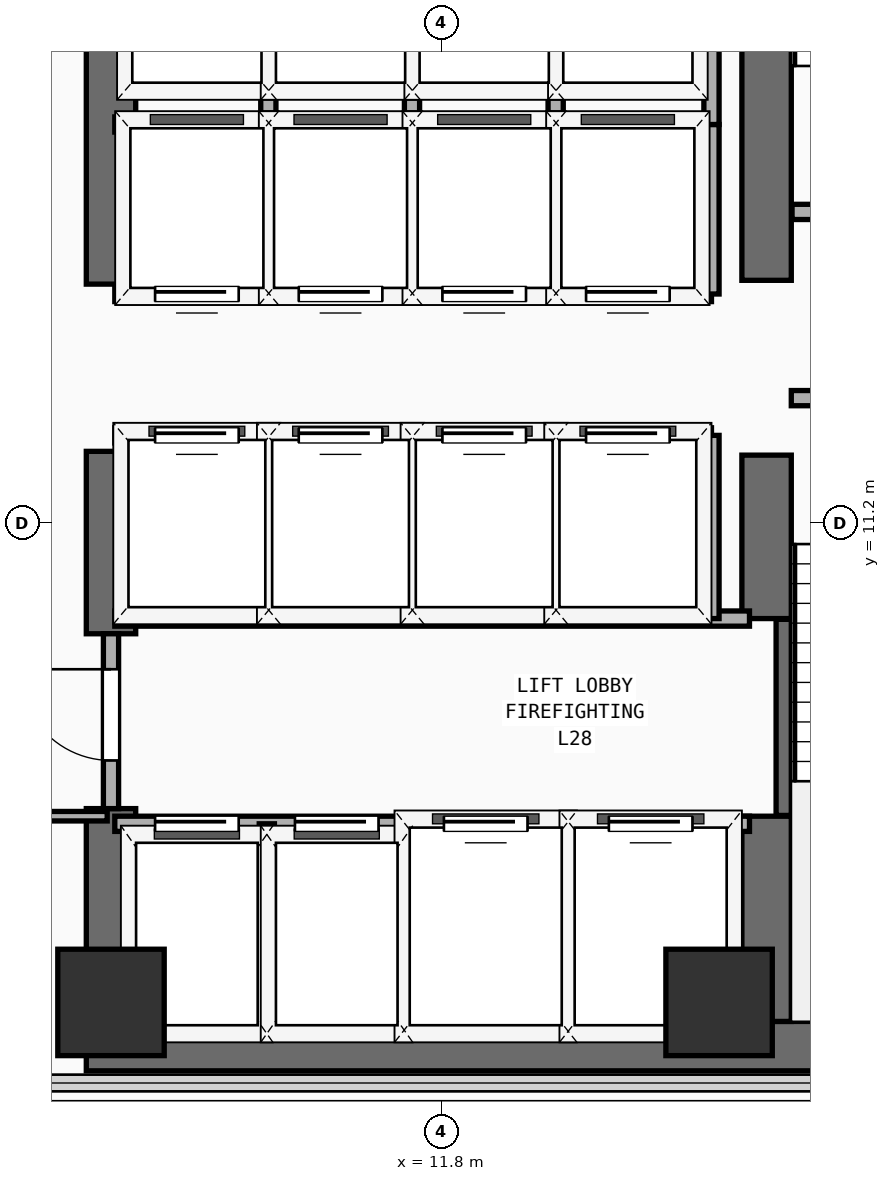
"""IFC4 building model, lengths in metres.
Left out: names, types, materials, properties, quantities, classifications, styles, units other than length and angle.
Written with IfcOpenShell. Run it as: python <this file> out.ifc"""

import sys

from ifc_helpers import new_model, si_unit, direction, frame, frame_2d, origin, origin_2d, place, context, subcontext, project, spatial, rectangle, extrude, element, fill, save


model = new_model("IFC4")
c1 = context("Model", 3, precision=1e-05, world=origin(), true_north=direction((0.0, 1.0)))
c2 = subcontext(c1, "Body", "Model", "MODEL_VIEW")
j1 = project(units=[si_unit("LENGTHUNIT", "METRE"), si_unit("PLANEANGLEUNIT", "RADIAN")], contexts=[c1])
p1 = place(None, origin())
s1 = spatial("IfcSite", under=j1, at=p1, CompositionType="ELEMENT")
p2 = place(p1, origin())
s2 = spatial("IfcBuilding", under=s1, at=p2, CompositionType="ELEMENT")
p3 = place(p2, frame((0.0, 0.0, 110.7)))
s3 = spatial("IfcBuildingStorey", under=s2, at=p3, CompositionType="ELEMENT", Elevation=110.7)
p4 = place(p3, frame((7.125, 4.325, 0.0), z_axis=(0.0, 0.0, 1.0), x_axis=(1.0, 0.0, 0.0)))
e1 = element("IfcWall", 1, at=p4, inside=s3, PredefinedType="SHEAR", context=c2, shape_type="SweptSolid", body=[
    extrude(rectangle(XDim=14.0, YDim=0.65, at=frame_2d((7.0, 0.0))), origin(), (0.0, 0.0, 1.0), 3.54),
])
p5 = place(p3, frame((7.45, 4.65, 0.0), z_axis=(0.0, 0.0, 1.0), x_axis=(0.0, 1.0, 0.0)))
e2 = element("IfcWall", 2, at=p5, inside=s3, PredefinedType="SHEAR", context=c2, shape_type="SweptSolid", body=[
    extrude(rectangle(XDim=2.8, YDim=0.65, at=frame_2d((1.4, 0.0))), origin(), (0.0, 0.0, 1.0), 3.54),
])
p6 = place(p3, frame((7.45, 9.75, 0.0), z_axis=(0.0, 0.0, 1.0), x_axis=(0.0, 1.0, 0.0)))
e3 = element("IfcWall", 3, at=p6, inside=s3, PredefinedType="SHEAR", context=c2, shape_type="SweptSolid", body=[
    extrude(rectangle(XDim=2.4, YDim=0.65, at=frame_2d((1.2, 0.0))), origin(), (0.0, 0.0, 1.0), 3.54),
])
p7 = place(p3, frame((7.45, 14.35, 0.0), z_axis=(0.0, 0.0, 1.0), x_axis=(0.0, 1.0, 0.0)))
e4 = element("IfcWall", 4, at=p7, inside=s3, PredefinedType="SHEAR", context=c2, shape_type="SweptSolid", body=[
    extrude(rectangle(XDim=4.81, YDim=0.65, at=frame_2d((2.405, 0.0))), origin(), (0.0, 0.0, 1.0), 3.54),
])
p8 = place(p3, frame((16.075, 4.65, 0.0), z_axis=(0.0, 0.0, 1.0), x_axis=(0.0, 1.0, 0.0)))
e5 = element("IfcWall", 5, at=p8, inside=s3, PredefinedType="SHEAR", context=c2, shape_type="SweptSolid", body=[
    extrude(rectangle(XDim=2.7, YDim=0.65, at=frame_2d((1.35, 0.0))), origin(), (0.0, 0.0, 1.0), 3.54),
])
p9 = place(p3, frame((16.075, 9.95, 0.0), z_axis=(0.0, 0.0, 1.0), x_axis=(0.0, 1.0, 0.0)))
e6 = element("IfcWall", 6, at=p9, inside=s3, PredefinedType="SHEAR", context=c2, shape_type="SweptSolid", body=[
    extrude(rectangle(XDim=2.15, YDim=0.65, at=frame_2d((1.075, 0.0))), origin(), (0.0, 0.0, 1.0), 3.54),
])
p10 = place(p3, frame((16.075, 14.4, 0.0), z_axis=(0.0, 0.0, 1.0), x_axis=(0.0, 1.0, 0.0)))
e7 = element("IfcWall", 7, at=p10, inside=s3, PredefinedType="SHEAR", context=c2, shape_type="SweptSolid", body=[
    extrude(rectangle(XDim=9.1, YDim=0.65, at=frame_2d((4.55, 0.0))), origin(), (0.0, 0.0, 1.0), 3.54),
])
for number, where, z_axis, x_axis in (
    (8, (7.45, 4.9, 0.0), (0.0, 0.0, 1.0), (1.0, 0.0, 0.0)),
    (9, (15.45, 4.9, 0.0), (0.0, 0.0, 1.0), (1.0, 0.0, 0.0)),
):
    element("IfcColumn", number, at=place(p3, frame(where, z_axis=z_axis, x_axis=x_axis)), inside=s3, PredefinedType="COLUMN", context=c2, shape_type="SweptSolid", body=[
        extrude(rectangle(XDim=1.4, YDim=1.4, at=origin_2d()), origin(), (0.0, 0.0, 1.0), 3.54),
    ])
p11 = place(p3, frame((16.3, 7.36, 0.0), z_axis=(0.0, 0.0, 1.0), x_axis=(0.0, 1.0, 0.0)))
e10 = element("IfcWall", 10, at=p11, inside=s3, PredefinedType="SHEAR", context=c2, shape_type="SweptSolid", body=[
    extrude(rectangle(XDim=2.58, YDim=0.2, at=frame_2d((1.29, 0.0))), origin(), (0.0, 0.0, 1.0), 3.54),
])
p12 = place(p3, frame((16.4, 12.85, 0.0), z_axis=(0.0, 0.0, 1.0), x_axis=(1.0, 0.0, 0.0)))
e11 = element("IfcWall", 11, at=p12, inside=s3, PredefinedType="PARTITIONING", context=c2, shape_type="SweptSolid", body=[
    extrude(rectangle(XDim=3.96, YDim=0.2, at=frame_2d((1.98, 0.0))), origin(), (0.0, 0.0, 1.0), 3.54),
])
p13 = place(p12, frame((1.304, 0.0, 0.0)))
e12 = element("IfcOpeningElement", 12, at=p13, cuts=e11, PredefinedType="OPENING", context=c2, shape_type="SweptSolid", body=[
    extrude(rectangle(XDim=1.1, YDim=2.2, at=frame_2d((0.55, 1.1))), frame((0.0, 0.11, 0.0), z_axis=(0.0, -1.0, 0.0), x_axis=(1.0, 0.0, 0.0)), (0.0, 0.0, 1.0), 0.22),
])
p14 = place(p3, frame((16.41, 15.3, 0.0), z_axis=(0.0, 0.0, 1.0), x_axis=(1.0, 0.0, 0.0)))
e13 = element("IfcWall", 13, at=p14, inside=s3, PredefinedType="PARTITIONING", context=c2, shape_type="SweptSolid", body=[
    extrude(rectangle(XDim=3.95, YDim=0.2, at=frame_2d((1.975, 0.0))), origin(), (0.0, 0.0, 1.0), 3.54),
])
p15 = place(p14, frame((1.294, 0.0, 0.0)))
e14 = element("IfcOpeningElement", 14, at=p15, cuts=e13, PredefinedType="OPENING", context=c2, shape_type="SweptSolid", body=[
    extrude(rectangle(XDim=1.1, YDim=2.2, at=frame_2d((0.55, 1.1))), frame((0.0, 0.11, 0.0), z_axis=(0.0, -1.0, 0.0), x_axis=(1.0, 0.0, 0.0)), (0.0, 0.0, 1.0), 0.22),
])
p16 = place(p3, frame((7.5, 7.25, 0.0), z_axis=(0.0, 0.0, 1.0), x_axis=(1.0, 0.0, 0.0)))
e15 = element("IfcWall", 15, at=p16, inside=s3, PredefinedType="PARTITIONING", context=c2, shape_type="SweptSolid", body=[
    extrude(rectangle(XDim=8.35, YDim=0.2, at=frame_2d((4.175, 0.0))), origin(), (0.0, 0.0, 1.0), 3.54),
])
p17 = place(p16, frame((0.53, 0.0, 0.0)))
e16 = element("IfcOpeningElement", 16, at=p17, cuts=e15, PredefinedType="OPENING", context=c2, shape_type="SweptSolid", body=[
    extrude(rectangle(XDim=1.1, YDim=2.2, at=frame_2d((0.55, 1.1))), frame((0.0, 0.11, 0.0), z_axis=(0.0, -1.0, 0.0), x_axis=(1.0, 0.0, 0.0)), (0.0, 0.0, 1.0), 0.22),
])
p18 = place(p16, frame((2.37, 0.0, 0.0)))
e17 = element("IfcOpeningElement", 17, at=p18, cuts=e15, PredefinedType="OPENING", context=c2, shape_type="SweptSolid", body=[
    extrude(rectangle(XDim=1.1, YDim=2.2, at=frame_2d((0.55, 1.1))), frame((0.0, 0.11, 0.0), z_axis=(0.0, -1.0, 0.0), x_axis=(1.0, 0.0, 0.0)), (0.0, 0.0, 1.0), 0.22),
])
p19 = place(p16, frame((4.33, 0.0, 0.0)))
e18 = element("IfcOpeningElement", 18, at=p19, cuts=e15, PredefinedType="OPENING", context=c2, shape_type="SweptSolid", body=[
    extrude(rectangle(XDim=1.1, YDim=2.2, at=frame_2d((0.55, 1.1))), frame((0.0, 0.11, 0.0), z_axis=(0.0, -1.0, 0.0), x_axis=(1.0, 0.0, 0.0)), (0.0, 0.0, 1.0), 0.22),
])
p20 = place(p16, frame((6.5, 0.0, 0.0)))
e19 = element("IfcOpeningElement", 19, at=p20, cuts=e15, PredefinedType="OPENING", context=c2, shape_type="SweptSolid", body=[
    extrude(rectangle(XDim=1.1, YDim=2.2, at=frame_2d((0.55, 1.1))), frame((0.0, 0.11, 0.0), z_axis=(0.0, -1.0, 0.0), x_axis=(1.0, 0.0, 0.0)), (0.0, 0.0, 1.0), 0.22),
])
p21 = place(p3, frame((7.5, 9.95, 0.0), z_axis=(0.0, 0.0, 1.0), x_axis=(1.0, 0.0, 0.0)))
e20 = element("IfcWall", 20, at=p21, inside=s3, PredefinedType="PARTITIONING", context=c2, shape_type="SweptSolid", body=[
    extrude(rectangle(XDim=8.35, YDim=0.2, at=frame_2d((4.175, 0.0))), origin(), (0.0, 0.0, 1.0), 3.54),
])
for number, where, z_axis, x_axis in (
    (21, (9.5, 4.45, 0.0), (0.0, 0.0, 1.0), (0.0, 1.0, 0.0)),
    (22, (11.36, 4.45, 0.0), (0.0, 0.0, 1.0), (0.0, 1.0, 0.0)),
    (23, (13.46, 4.45, 0.0), (0.0, 0.0, 1.0), (0.0, 1.0, 0.0)),
):
    element("IfcWall", number, at=place(p3, frame(where, z_axis=z_axis, x_axis=x_axis)), inside=s3, PredefinedType="PARTITIONING", context=c2, shape_type="SweptSolid", body=[
        extrude(rectangle(XDim=2.8, YDim=0.2, at=frame_2d((1.4, 0.0))), origin(), (0.0, 0.0, 1.0), 3.54),
    ])
p22 = place(p3, frame((7.45, 7.45, 0.0), z_axis=(0.0, 0.0, 1.0), x_axis=(0.0, 1.0, 0.0)))
e24 = element("IfcWall", 24, at=p22, inside=s3, PredefinedType="PARTITIONING", context=c2, shape_type="SweptSolid", body=[
    extrude(rectangle(XDim=2.3, YDim=0.2, at=frame_2d((1.15, 0.0))), origin(), (0.0, 0.0, 1.0), 2.52),
])
p23 = place(p22, frame((0.633, 0.0, 0.0)))
e25 = element("IfcOpeningElement", 25, at=p23, cuts=e24, PredefinedType="OPENING", context=c2, shape_type="SweptSolid", body=[
    extrude(rectangle(XDim=1.2, YDim=2.25, at=frame_2d((0.6, 1.125))), frame((0.0, 0.11, 0.0), z_axis=(0.0, -1.0, 0.0), x_axis=(1.0, 0.0, 0.0)), (0.0, 0.0, 1.0), 0.22),
])
p24 = place(p3, frame((7.5, 12.36, 0.0), z_axis=(0.0, 0.0, 1.0), x_axis=(1.0, 0.0, 0.0)))
e26 = element("IfcWall", 26, at=p24, inside=s3, PredefinedType="PARTITIONING", context=c2, shape_type="SweptSolid", body=[
    extrude(rectangle(XDim=7.85, YDim=0.2, at=frame_2d((3.925, 0.0))), origin(), (0.0, 0.0, 1.0), 3.54),
])
p25 = place(p24, frame((0.53, 0.0, 0.0)))
e27 = element("IfcOpeningElement", 27, at=p25, cuts=e26, PredefinedType="OPENING", context=c2, shape_type="SweptSolid", body=[
    extrude(rectangle(XDim=1.1, YDim=2.2, at=frame_2d((0.55, 1.1))), frame((0.0, 0.11, 0.0), z_axis=(0.0, -1.0, 0.0), x_axis=(1.0, 0.0, 0.0)), (0.0, 0.0, 1.0), 0.22),
])
p26 = place(p24, frame((2.42, 0.0, 0.0)))
e28 = element("IfcOpeningElement", 28, at=p26, cuts=e26, PredefinedType="OPENING", context=c2, shape_type="SweptSolid", body=[
    extrude(rectangle(XDim=1.1, YDim=2.2, at=frame_2d((0.55, 1.1))), frame((0.0, 0.11, 0.0), z_axis=(0.0, -1.0, 0.0), x_axis=(1.0, 0.0, 0.0)), (0.0, 0.0, 1.0), 0.22),
])
p27 = place(p24, frame((4.31, 0.0, 0.0)))
e29 = element("IfcOpeningElement", 29, at=p27, cuts=e26, PredefinedType="OPENING", context=c2, shape_type="SweptSolid", body=[
    extrude(rectangle(XDim=1.1, YDim=2.2, at=frame_2d((0.55, 1.1))), frame((0.0, 0.11, 0.0), z_axis=(0.0, -1.0, 0.0), x_axis=(1.0, 0.0, 0.0)), (0.0, 0.0, 1.0), 0.22),
])
p28 = place(p24, frame((6.2, 0.0, 0.0)))
e30 = element("IfcOpeningElement", 30, at=p28, cuts=e26, PredefinedType="OPENING", context=c2, shape_type="SweptSolid", body=[
    extrude(rectangle(XDim=1.1, YDim=2.2, at=frame_2d((0.55, 1.1))), frame((0.0, 0.11, 0.0), z_axis=(0.0, -1.0, 0.0), x_axis=(1.0, 0.0, 0.0)), (0.0, 0.0, 1.0), 0.22),
])
for number, where, z_axis, x_axis in (
    (31, (15.35, 9.95, 0.0), (0.0, 0.0, 1.0), (0.0, 1.0, 0.0)),
    (32, (9.52, 9.95, 0.0), (0.0, 0.0, 1.0), (0.0, 1.0, 0.0)),
    (33, (11.41, 9.95, 0.0), (0.0, 0.0, 1.0), (0.0, 1.0, 0.0)),
    (34, (13.3, 9.95, 0.0), (0.0, 0.0, 1.0), (0.0, 1.0, 0.0)),
):
    element("IfcWall", number, at=place(p3, frame(where, z_axis=z_axis, x_axis=x_axis)), inside=s3, PredefinedType="PARTITIONING", context=c2, shape_type="SweptSolid", body=[
        extrude(rectangle(XDim=2.41, YDim=0.2, at=frame_2d((1.205, 0.0))), origin(), (0.0, 0.0, 1.0), 3.54),
    ])
p29 = place(p3, frame((7.5, 14.22, 0.0), z_axis=(0.0, 0.0, 1.0), x_axis=(1.0, 0.0, 0.0)))
e35 = element("IfcWall", 35, at=p29, inside=s3, PredefinedType="PARTITIONING", context=c2, shape_type="SweptSolid", body=[
    extrude(rectangle(XDim=7.85, YDim=0.2, at=frame_2d((3.925, 0.0))), origin(), (0.0, 0.0, 1.0), 3.54),
])
p30 = place(p29, frame((0.53, 0.0, 0.0)))
e36 = element("IfcOpeningElement", 36, at=p30, cuts=e35, PredefinedType="OPENING", context=c2, shape_type="SweptSolid", body=[
    extrude(rectangle(XDim=1.1, YDim=2.2, at=frame_2d((0.55, 1.1))), frame((0.0, 0.11, 0.0), z_axis=(0.0, -1.0, 0.0), x_axis=(1.0, 0.0, 0.0)), (0.0, 0.0, 1.0), 0.22),
])
p31 = place(p29, frame((2.42, 0.0, 0.0)))
e37 = element("IfcOpeningElement", 37, at=p31, cuts=e35, PredefinedType="OPENING", context=c2, shape_type="SweptSolid", body=[
    extrude(rectangle(XDim=1.1, YDim=2.2, at=frame_2d((0.55, 1.1))), frame((0.0, 0.11, 0.0), z_axis=(0.0, -1.0, 0.0), x_axis=(1.0, 0.0, 0.0)), (0.0, 0.0, 1.0), 0.22),
])
p32 = place(p29, frame((4.31, 0.0, 0.0)))
e38 = element("IfcOpeningElement", 38, at=p32, cuts=e35, PredefinedType="OPENING", context=c2, shape_type="SweptSolid", body=[
    extrude(rectangle(XDim=1.1, YDim=2.2, at=frame_2d((0.55, 1.1))), frame((0.0, 0.11, 0.0), z_axis=(0.0, -1.0, 0.0), x_axis=(1.0, 0.0, 0.0)), (0.0, 0.0, 1.0), 0.22),
])
p33 = place(p29, frame((6.2, 0.0, 0.0)))
e39 = element("IfcOpeningElement", 39, at=p33, cuts=e35, PredefinedType="OPENING", context=c2, shape_type="SweptSolid", body=[
    extrude(rectangle(XDim=1.1, YDim=2.2, at=frame_2d((0.55, 1.1))), frame((0.0, 0.11, 0.0), z_axis=(0.0, -1.0, 0.0), x_axis=(1.0, 0.0, 0.0)), (0.0, 0.0, 1.0), 0.22),
])
p34 = place(p3, frame((7.5, 16.45, 0.0), z_axis=(0.0, 0.0, 1.0), x_axis=(1.0, 0.0, 0.0)))
e40 = element("IfcWall", 40, at=p34, inside=s3, PredefinedType="PARTITIONING", context=c2, shape_type="SweptSolid", body=[
    extrude(rectangle(XDim=7.85, YDim=0.2, at=frame_2d((3.925, 0.0))), origin(), (0.0, 0.0, 1.0), 3.54),
])
for number, where, z_axis, x_axis in (
    (41, (15.35, 14.22, 0.0), (0.0, 0.0, 1.0), (0.0, 1.0, 0.0)),
    (42, (9.52, 14.22, 0.0), (0.0, 0.0, 1.0), (0.0, 1.0, 0.0)),
    (43, (11.41, 14.22, 0.0), (0.0, 0.0, 1.0), (0.0, 1.0, 0.0)),
    (44, (13.3, 14.22, 0.0), (0.0, 0.0, 1.0), (0.0, 1.0, 0.0)),
):
    element("IfcWall", number, at=place(p3, frame(where, z_axis=z_axis, x_axis=x_axis)), inside=s3, PredefinedType="PARTITIONING", context=c2, shape_type="SweptSolid", body=[
        extrude(rectangle(XDim=2.23, YDim=0.2, at=frame_2d((1.115, 0.0))), origin(), (0.0, 0.0, 1.0), 3.54),
    ])
for number, where, z_axis, x_axis in (
    (45, (15.35, 16.45, 0.0), (0.0, 0.0, 1.0), (0.0, 1.0, 0.0)),
    (46, (9.52, 16.45, 0.0), (0.0, 0.0, 1.0), (0.0, 1.0, 0.0)),
    (47, (11.41, 16.45, 0.0), (0.0, 0.0, 1.0), (0.0, 1.0, 0.0)),
    (48, (13.3, 16.45, 0.0), (0.0, 0.0, 1.0), (0.0, 1.0, 0.0)),
):
    element("IfcWall", number, at=place(p3, frame(where, z_axis=z_axis, x_axis=x_axis)), inside=s3, PredefinedType="PARTITIONING", context=c2, shape_type="SweptSolid", body=[
        extrude(rectangle(XDim=2.67, YDim=0.2, at=frame_2d((1.335, 0.0))), origin(), (0.0, 0.0, 1.0), 3.54),
    ])
p35 = place(p3, frame((1.64, 7.35, 0.0), z_axis=(0.0, 0.0, 1.0), x_axis=(1.0, 0.0, 0.0)))
e49 = element("IfcWall", 49, at=p35, inside=s3, PredefinedType="PARTITIONING", context=c2, shape_type="SweptSolid", body=[
    extrude(rectangle(XDim=5.76, YDim=0.125, at=frame_2d((2.88, 0.0))), origin(), (0.0, 0.0, 1.0), 3.54),
])
p36 = place(p35, frame((4.087, 0.0, 0.0)))
e50 = element("IfcOpeningElement", 50, at=p36, cuts=e49, PredefinedType="OPENING", context=c2, shape_type="SweptSolid", body=[
    extrude(rectangle(XDim=0.85, YDim=2.15, at=frame_2d((0.425, 1.075))), frame((0.0, 0.073, 0.0), z_axis=(0.0, -1.0, 0.0), x_axis=(1.0, 0.0, 0.0)), (0.0, 0.0, 1.0), 0.145),
])
p37 = place(p17, origin())
e51 = element("IfcDoor", 51, at=p37, inside=s3, OperationType="SLIDING_TO_LEFT", PredefinedType="DOOR", context=c2, shape_type="SweptSolid", body=[
    extrude(rectangle(XDim=1.1, YDim=2.2, at=frame_2d((0.55, 1.1))), frame((0.0, 0.025, 0.0), z_axis=(0.0, -1.0, 0.0), x_axis=(1.0, 0.0, 0.0)), (0.0, 0.0, 1.0), 0.05),
])
fill(e16, e51)
p38 = place(p18, origin())
e52 = element("IfcDoor", 52, at=p38, inside=s3, OperationType="SLIDING_TO_LEFT", PredefinedType="DOOR", context=c2, shape_type="SweptSolid", body=[
    extrude(rectangle(XDim=1.1, YDim=2.2, at=frame_2d((0.55, 1.1))), frame((0.0, 0.025, 0.0), z_axis=(0.0, -1.0, 0.0), x_axis=(1.0, 0.0, 0.0)), (0.0, 0.0, 1.0), 0.05),
])
fill(e17, e52)
p39 = place(p19, origin())
e53 = element("IfcDoor", 53, at=p39, inside=s3, OperationType="SLIDING_TO_LEFT", PredefinedType="DOOR", context=c2, shape_type="SweptSolid", body=[
    extrude(rectangle(XDim=1.1, YDim=2.2, at=frame_2d((0.55, 1.1))), frame((0.0, 0.025, 0.0), z_axis=(0.0, -1.0, 0.0), x_axis=(1.0, 0.0, 0.0)), (0.0, 0.0, 1.0), 0.05),
])
fill(e18, e53)
p40 = place(p20, origin())
e54 = element("IfcDoor", 54, at=p40, inside=s3, OperationType="SLIDING_TO_LEFT", PredefinedType="DOOR", context=c2, shape_type="SweptSolid", body=[
    extrude(rectangle(XDim=1.1, YDim=2.2, at=frame_2d((0.55, 1.1))), frame((0.0, 0.025, 0.0), z_axis=(0.0, -1.0, 0.0), x_axis=(1.0, 0.0, 0.0)), (0.0, 0.0, 1.0), 0.05),
])
fill(e19, e54)
p41 = place(p23, frame((1.2, 0.0, 0.0), z_axis=(0.0, 0.0, 1.0), x_axis=(-1.0, 0.0, 0.0)))
e55 = element("IfcDoor", 55, at=p41, inside=s3, OperationType="SINGLE_SWING_LEFT", PredefinedType="DOOR", context=c2, shape_type="SweptSolid", body=[
    extrude(rectangle(XDim=1.2, YDim=2.25, at=frame_2d((0.6, 1.125))), frame((0.0, 0.025, 0.0), z_axis=(0.0, -1.0, 0.0), x_axis=(1.0, 0.0, 0.0)), (0.0, 0.0, 1.0), 0.05),
])
fill(e25, e55)
p42 = place(p25, origin())
e56 = element("IfcDoor", 56, at=p42, inside=s3, OperationType="SLIDING_TO_LEFT", PredefinedType="DOOR", context=c2, shape_type="SweptSolid", body=[
    extrude(rectangle(XDim=1.1, YDim=2.2, at=frame_2d((0.55, 1.1))), frame((0.0, 0.025, 0.0), z_axis=(0.0, -1.0, 0.0), x_axis=(1.0, 0.0, 0.0)), (0.0, 0.0, 1.0), 0.05),
])
fill(e27, e56)
p43 = place(p26, origin())
e57 = element("IfcDoor", 57, at=p43, inside=s3, OperationType="SLIDING_TO_LEFT", PredefinedType="DOOR", context=c2, shape_type="SweptSolid", body=[
    extrude(rectangle(XDim=1.1, YDim=2.2, at=frame_2d((0.55, 1.1))), frame((0.0, 0.025, 0.0), z_axis=(0.0, -1.0, 0.0), x_axis=(1.0, 0.0, 0.0)), (0.0, 0.0, 1.0), 0.05),
])
fill(e28, e57)
p44 = place(p27, origin())
e58 = element("IfcDoor", 58, at=p44, inside=s3, OperationType="SLIDING_TO_LEFT", PredefinedType="DOOR", context=c2, shape_type="SweptSolid", body=[
    extrude(rectangle(XDim=1.1, YDim=2.2, at=frame_2d((0.55, 1.1))), frame((0.0, 0.025, 0.0), z_axis=(0.0, -1.0, 0.0), x_axis=(1.0, 0.0, 0.0)), (0.0, 0.0, 1.0), 0.05),
])
fill(e29, e58)
p45 = place(p28, origin())
e59 = element("IfcDoor", 59, at=p45, inside=s3, OperationType="SLIDING_TO_LEFT", PredefinedType="DOOR", context=c2, shape_type="SweptSolid", body=[
    extrude(rectangle(XDim=1.1, YDim=2.2, at=frame_2d((0.55, 1.1))), frame((0.0, 0.025, 0.0), z_axis=(0.0, -1.0, 0.0), x_axis=(1.0, 0.0, 0.0)), (0.0, 0.0, 1.0), 0.05),
])
fill(e30, e59)
p46 = place(p30, frame((1.1, 0.0, 0.0), z_axis=(0.0, 0.0, 1.0), x_axis=(-1.0, 0.0, 0.0)))
e60 = element("IfcDoor", 60, at=p46, inside=s3, OperationType="SLIDING_TO_LEFT", PredefinedType="DOOR", context=c2, shape_type="SweptSolid", body=[
    extrude(rectangle(XDim=1.1, YDim=2.2, at=frame_2d((0.55, 1.1))), frame((0.0, 0.025, 0.0), z_axis=(0.0, -1.0, 0.0), x_axis=(1.0, 0.0, 0.0)), (0.0, 0.0, 1.0), 0.05),
])
fill(e36, e60)
p47 = place(p31, frame((1.1, 0.0, 0.0), z_axis=(0.0, 0.0, 1.0), x_axis=(-1.0, 0.0, 0.0)))
e61 = element("IfcDoor", 61, at=p47, inside=s3, OperationType="SLIDING_TO_LEFT", PredefinedType="DOOR", context=c2, shape_type="SweptSolid", body=[
    extrude(rectangle(XDim=1.1, YDim=2.2, at=frame_2d((0.55, 1.1))), frame((0.0, 0.025, 0.0), z_axis=(0.0, -1.0, 0.0), x_axis=(1.0, 0.0, 0.0)), (0.0, 0.0, 1.0), 0.05),
])
fill(e37, e61)
p48 = place(p32, frame((1.1, 0.0, 0.0), z_axis=(0.0, 0.0, 1.0), x_axis=(-1.0, 0.0, 0.0)))
e62 = element("IfcDoor", 62, at=p48, inside=s3, OperationType="SLIDING_TO_LEFT", PredefinedType="DOOR", context=c2, shape_type="SweptSolid", body=[
    extrude(rectangle(XDim=1.1, YDim=2.2, at=frame_2d((0.55, 1.1))), frame((0.0, 0.025, 0.0), z_axis=(0.0, -1.0, 0.0), x_axis=(1.0, 0.0, 0.0)), (0.0, 0.0, 1.0), 0.05),
])
fill(e38, e62)
p49 = place(p33, frame((1.1, 0.0, 0.0), z_axis=(0.0, 0.0, 1.0), x_axis=(-1.0, 0.0, 0.0)))
e63 = element("IfcDoor", 63, at=p49, inside=s3, OperationType="SLIDING_TO_LEFT", PredefinedType="DOOR", context=c2, shape_type="SweptSolid", body=[
    extrude(rectangle(XDim=1.1, YDim=2.2, at=frame_2d((0.55, 1.1))), frame((0.0, 0.025, 0.0), z_axis=(0.0, -1.0, 0.0), x_axis=(1.0, 0.0, 0.0)), (0.0, 0.0, 1.0), 0.05),
])
fill(e39, e63)
save(model, sys.argv[1])
